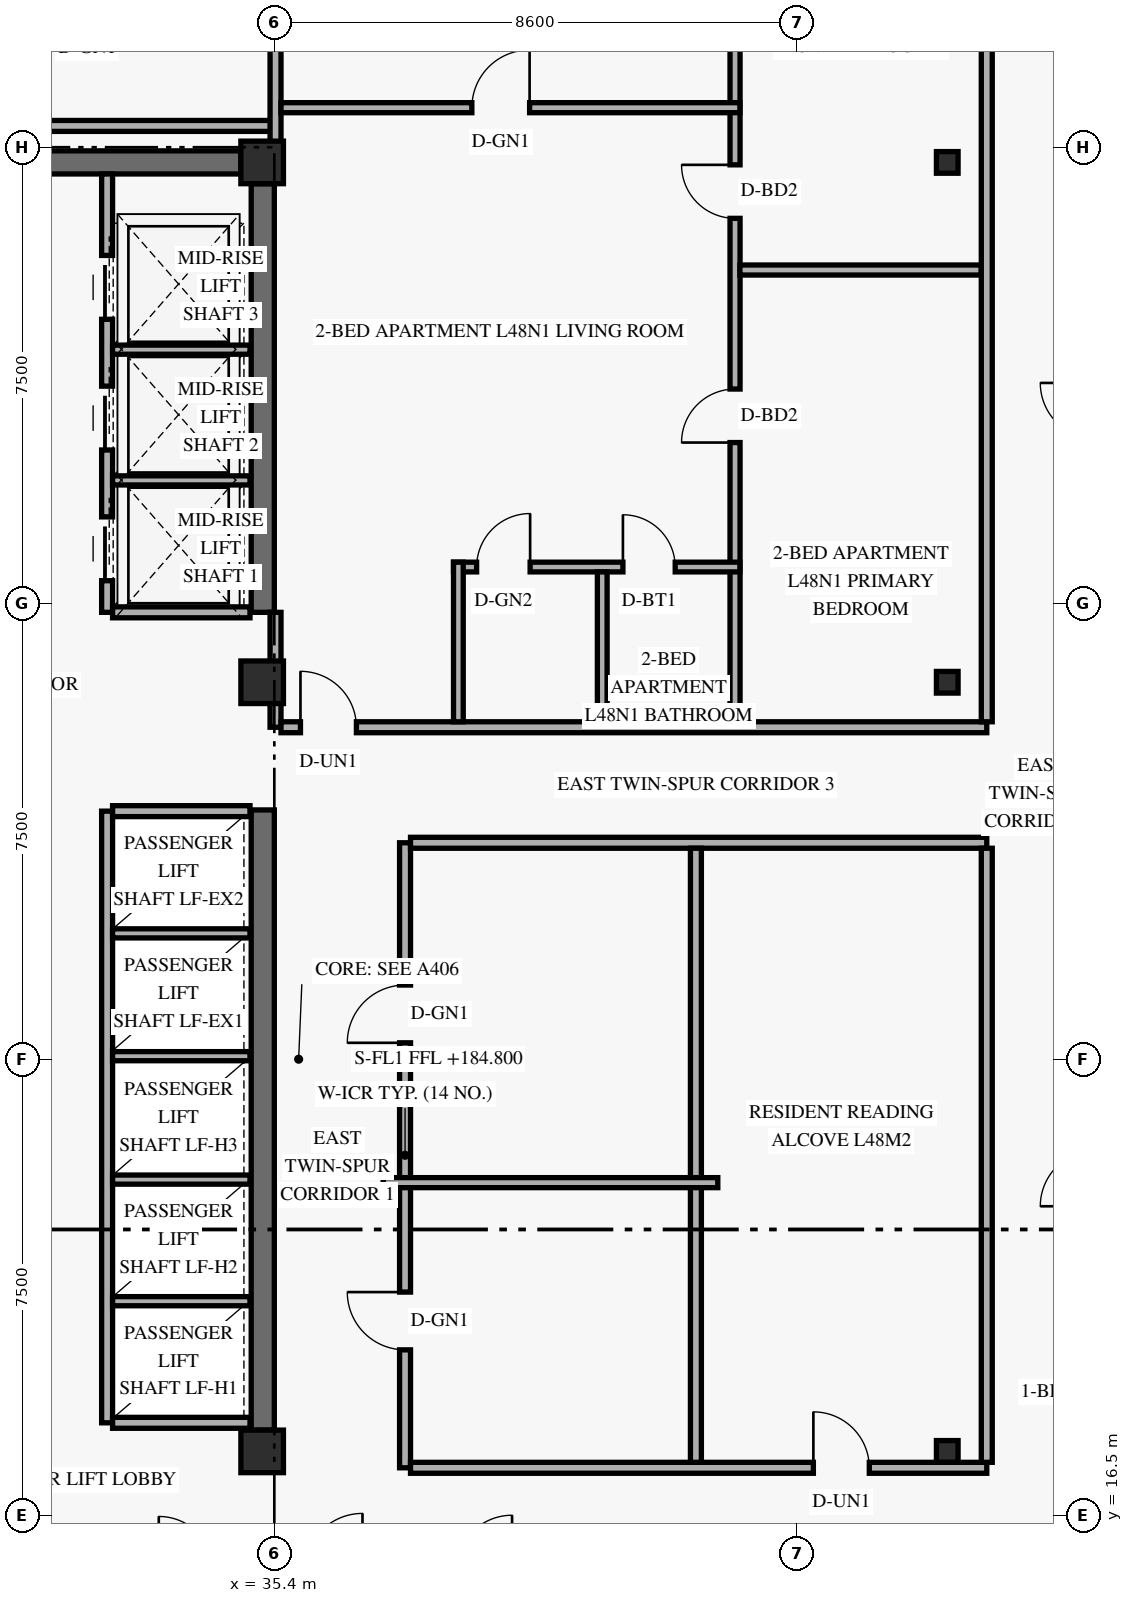
"""IFC4 building model, lengths in metres.
Left out: names, types, materials, properties, quantities, classifications, styles, units other than length and angle.
Written with IfcOpenShell. Run it as: python <this file> out.ifc"""

import sys

from ifc_helpers import new_model, si_unit, direction, frame, frame_2d, origin, origin_2d, place, context, subcontext, project, spatial, rectangle, hollow_rectangle, extrude, element, fill, save


model = new_model("IFC4")
c1 = context("Model", 3, precision=1e-05, world=origin(), true_north=direction((0.0, 1.0)))
c2 = subcontext(c1, "Body", "Model", "MODEL_VIEW")
j1 = project(units=[si_unit("LENGTHUNIT", "METRE"), si_unit("PLANEANGLEUNIT", "RADIAN")], contexts=[c1])
p1 = place(None, origin())
s1 = spatial("IfcSite", under=j1, at=p1, CompositionType="ELEMENT")
p2 = place(p1, origin())
s2 = spatial("IfcBuilding", under=s1, at=p2, CompositionType="ELEMENT")
p3 = place(p2, frame((0.0, 0.0, 184.8)))
s3 = spatial("IfcBuildingStorey", under=s2, at=p3, CompositionType="ELEMENT", Elevation=184.8)
p4 = place(p3, frame((35.21, 17.9, 0.0), z_axis=(0.0, 0.0, 1.0), x_axis=(0.0, 1.0, 0.0)))
e1 = element("IfcWall", 1, at=p4, inside=s3, PredefinedType="SHEAR", context=c2, shape_type="SweptSolid", body=[
    extrude(rectangle(XDim=10.2, YDim=0.38, at=frame_2d((5.1, 0.0))), origin(), (0.0, 0.0, 1.0), 2.748),
])
p5 = place(p3, frame((35.21, 31.35, 0.0), z_axis=(0.0, 0.0, 1.0), x_axis=(0.0, 1.0, 0.0)))
e2 = element("IfcWall", 2, at=p5, inside=s3, PredefinedType="SHEAR", context=c2, shape_type="SweptSolid", body=[
    extrude(rectangle(XDim=7.05, YDim=0.38, at=frame_2d((3.525, 0.0))), origin(), (0.0, 0.0, 1.0), 2.748),
])
p6 = place(p3, frame((24.55, 38.75, 0.0), z_axis=(0.0, 0.0, 1.0), x_axis=(1.0, 0.0, 0.0)))
e3 = element("IfcWall", 3, at=p6, inside=s3, PredefinedType="SHEAR", context=c2, shape_type="SweptSolid", body=[
    extrude(rectangle(XDim=10.3, YDim=0.38, at=frame_2d((5.15, 0.0))), origin(), (0.0, 0.0, 1.0), 3.36),
])
p7 = place(p6, frame((5.2, 0.0, 0.0)))
e4 = element("IfcOpeningElement", 4, at=p7, cuts=e3, PredefinedType="OPENING", context=c2, shape_type="SweptSolid", body=[
    extrude(rectangle(XDim=1.05, YDim=2.15, at=frame_2d((0.525, 1.075))), frame((0.0, 0.2, 0.0), z_axis=(0.0, -1.0, 0.0), x_axis=(1.0, 0.0, 0.0)), (0.0, 0.0, 1.0), 0.4),
])
for number, where, z_axis, x_axis in (
    (5, (35.2, 17.55, 0.0), (0.0, 0.0, 1.0), (1.0, 0.0, 0.0)),
    (6, (35.2, 30.2, 0.0), (0.0, 0.0, 1.0), (1.0, 0.0, 0.0)),
    (7, (35.2, 38.75, 0.0), (0.0, 0.0, 1.0), (1.0, 0.0, 0.0)),
):
    element("IfcColumn", number, at=place(p3, frame(where, z_axis=z_axis, x_axis=x_axis)), inside=s3, PredefinedType="COLUMN", context=c2, shape_type="SweptSolid", body=[
        extrude(rectangle(XDim=0.7, YDim=0.7, at=origin_2d()), origin(), (0.0, 0.0, 1.0), 3.6),
    ])
for number, where, z_axis, x_axis in (
    (8, (46.404, 17.55, 0.0), (0.035, 0.0, 0.999), (0.0, 1.0, 0.0)),
    (9, (46.404, 30.2, 0.0), (0.035, 0.0, 0.999), (0.0, 1.0, 0.0)),
    (10, (46.404, 38.75, 0.0), (0.035, 0.0, 0.999), (0.0, 1.0, 0.0)),
):
    element("IfcColumn", number, at=place(p3, frame(where, z_axis=z_axis, x_axis=x_axis)), inside=s3, PredefinedType="COLUMN", context=c2, shape_type="SweptSolid", body=[
        extrude(hollow_rectangle(XDim=0.356, YDim=0.356, WallThickness=0.016, at=origin_2d()), origin(), (0.0, 0.0, 1.0), 3.602),
    ])
p8 = place(p3, frame((32.65, 18.02, 0.0), z_axis=(0.0, 0.0, 1.0), x_axis=(0.0, 1.0, 0.0)))
e11 = element("IfcWall", 11, at=p8, inside=s3, PredefinedType="STANDARD", context=c2, shape_type="SweptSolid", body=[
    extrude(rectangle(XDim=10.06, YDim=0.18, at=frame_2d((5.03, 0.0))), origin(), (0.0, 0.0, 1.0), 3.36),
])
for number, where, z_axis, x_axis in (
    (12, (32.74, 18.02, 0.0), (0.0, 0.0, 1.0), (1.0, 0.0, 0.0)),
    (13, (32.74, 28.08, 0.0), (0.0, 0.0, 1.0), (1.0, 0.0, 0.0)),
):
    element("IfcWall", number, at=place(p3, frame(where, z_axis=z_axis, x_axis=x_axis)), inside=s3, PredefinedType="STANDARD", context=c2, shape_type="SweptSolid", body=[
        extrude(rectangle(XDim=2.26, YDim=0.18, at=frame_2d((1.13, 0.0))), origin(), (0.0, 0.0, 1.0), 3.36),
    ])
for number, where, z_axis, x_axis in (
    (14, (32.74, 20.02, 0.0), (0.0, 0.0, 1.0), (1.0, 0.0, 0.0)),
    (15, (32.74, 22.02, 0.0), (0.0, 0.0, 1.0), (1.0, 0.0, 0.0)),
    (16, (32.74, 24.05, 0.0), (0.0, 0.0, 1.0), (1.0, 0.0, 0.0)),
    (17, (32.74, 26.07, 0.0), (0.0, 0.0, 1.0), (1.0, 0.0, 0.0)),
):
    element("IfcWall", number, at=place(p3, frame(where, z_axis=z_axis, x_axis=x_axis)), inside=s3, PredefinedType="STANDARD", context=c2, shape_type="SweptSolid", body=[
        extrude(rectangle(XDim=2.26, YDim=0.15, at=frame_2d((1.13, 0.0))), origin(), (0.0, 0.0, 1.0), 3.36),
    ])
p9 = place(p3, frame((32.65, 31.35, 0.0), z_axis=(0.0, 0.0, 1.0), x_axis=(0.0, 1.0, 0.0)))
e18 = element("IfcWall", 18, at=p9, inside=s3, PredefinedType="STANDARD", context=c2, shape_type="SweptSolid", body=[
    extrude(rectangle(XDim=7.21, YDim=0.18, at=frame_2d((3.605, 0.0))), origin(), (0.0, 0.0, 1.0), 3.36),
])
p10 = place(p9, frame((0.52, 0.0, 0.0)))
e19 = element("IfcOpeningElement", 19, at=p10, cuts=e18, PredefinedType="OPENING", context=c2, shape_type="SweptSolid", body=[
    extrude(rectangle(XDim=1.05, YDim=2.2, at=frame_2d((0.525, 1.1))), frame((0.0, 0.1, 0.0), z_axis=(0.0, -1.0, 0.0), x_axis=(1.0, 0.0, 0.0)), (0.0, 0.0, 1.0), 0.2),
])
p11 = place(p9, frame((2.67, 0.0, 0.0)))
e20 = element("IfcOpeningElement", 20, at=p11, cuts=e18, PredefinedType="OPENING", context=c2, shape_type="SweptSolid", body=[
    extrude(rectangle(XDim=1.05, YDim=2.2, at=frame_2d((0.525, 1.1))), frame((0.0, 0.1, 0.0), z_axis=(0.0, -1.0, 0.0), x_axis=(1.0, 0.0, 0.0)), (0.0, 0.0, 1.0), 0.2),
])
p12 = place(p9, frame((4.82, 0.0, 0.0)))
e21 = element("IfcOpeningElement", 21, at=p12, cuts=e18, PredefinedType="OPENING", context=c2, shape_type="SweptSolid", body=[
    extrude(rectangle(XDim=1.05, YDim=2.2, at=frame_2d((0.525, 1.1))), frame((0.0, 0.1, 0.0), z_axis=(0.0, -1.0, 0.0), x_axis=(1.0, 0.0, 0.0)), (0.0, 0.0, 1.0), 0.2),
])
p13 = place(p3, frame((32.74, 31.35, 0.0), z_axis=(0.0, 0.0, 1.0), x_axis=(1.0, 0.0, 0.0)))
e22 = element("IfcWall", 22, at=p13, inside=s3, PredefinedType="STANDARD", context=c2, shape_type="SweptSolid", body=[
    extrude(rectangle(XDim=2.26, YDim=0.18, at=frame_2d((1.13, 0.0))), origin(), (0.0, 0.0, 1.0), 3.36),
])
for number, where, z_axis, x_axis in (
    (23, (32.74, 33.52, 0.0), (0.0, 0.0, 1.0), (1.0, 0.0, 0.0)),
    (24, (32.74, 35.67, 0.0), (0.0, 0.0, 1.0), (1.0, 0.0, 0.0)),
):
    element("IfcWall", number, at=place(p3, frame(where, z_axis=z_axis, x_axis=x_axis)), inside=s3, PredefinedType="STANDARD", context=c2, shape_type="SweptSolid", body=[
        extrude(rectangle(XDim=2.26, YDim=0.15, at=frame_2d((1.13, 0.0))), origin(), (0.0, 0.0, 1.0), 3.36),
    ])
p14 = place(p3, frame((37.55, 17.28, 0.0), z_axis=(0.0, 0.0, 1.0), x_axis=(0.0, 1.0, 0.0)))
e25 = element("IfcWall", 25, at=p14, inside=s3, PredefinedType="STANDARD", context=c2, shape_type="SweptSolid", body=[
    extrude(rectangle(XDim=10.28, YDim=0.18, at=frame_2d((5.14, 0.0))), origin(), (0.0, 0.0, 1.0), 2.73),
])
p15 = place(p14, frame((1.94, 0.0, 0.0)))
e26 = element("IfcOpeningElement", 26, at=p15, cuts=e25, PredefinedType="OPENING", context=c2, shape_type="SweptSolid", body=[
    extrude(rectangle(XDim=0.95, YDim=2.15, at=frame_2d((0.475, 1.075))), frame((0.0, 0.1, 0.0), z_axis=(0.0, -1.0, 0.0), x_axis=(1.0, 0.0, 0.0)), (0.0, 0.0, 1.0), 0.2),
])
p16 = place(p14, frame((6.99, 0.0, 0.0)))
e27 = element("IfcOpeningElement", 27, at=p16, cuts=e25, PredefinedType="OPENING", context=c2, shape_type="SweptSolid", body=[
    extrude(rectangle(XDim=0.95, YDim=2.15, at=frame_2d((0.475, 1.075))), frame((0.0, 0.1, 0.0), z_axis=(0.0, -1.0, 0.0), x_axis=(1.0, 0.0, 0.0)), (0.0, 0.0, 1.0), 0.2),
])
p17 = place(p3, frame((37.64, 17.28, 0.0), z_axis=(0.0, 0.0, 1.0), x_axis=(1.0, 0.0, 0.0)))
e28 = element("IfcWall", 28, at=p17, inside=s3, PredefinedType="STANDARD", context=c2, shape_type="SweptSolid", body=[
    extrude(rectangle(XDim=9.477, YDim=0.18, at=frame_2d((4.739, 0.0))), origin(), (0.0, 0.0, 1.0), 2.73),
])
p18 = place(p17, frame((6.625, 0.0, 0.0)))
e29 = element("IfcOpeningElement", 29, at=p18, cuts=e28, PredefinedType="OPENING", context=c2, shape_type="SweptSolid", body=[
    extrude(rectangle(XDim=0.92, YDim=2.15, at=frame_2d((0.46, 1.075))), frame((0.0, 0.1, 0.0), z_axis=(0.0, -1.0, 0.0), x_axis=(1.0, 0.0, 0.0)), (0.0, 0.0, 1.0), 0.2),
])
p19 = place(p3, frame((37.64, 27.56, 0.0), z_axis=(0.0, 0.0, 1.0), x_axis=(1.0, 0.0, 0.0)))
e30 = element("IfcWall", 30, at=p19, inside=s3, PredefinedType="STANDARD", context=c2, shape_type="SweptSolid", body=[
    extrude(rectangle(XDim=9.477, YDim=0.18, at=frame_2d((4.739, 0.0))), origin(), (0.0, 0.0, 1.0), 2.73),
])
p20 = place(p3, frame((35.42, 29.46, 0.0), z_axis=(0.0, 0.0, 1.0), x_axis=(0.0, 1.0, 0.0)))
e31 = element("IfcWall", 31, at=p20, inside=s3, PredefinedType="STANDARD", context=c2, shape_type="SweptSolid", body=[
    extrude(rectangle(XDim=1.89, YDim=0.18, at=frame_2d((0.945, 0.0))), origin(), (0.0, 0.0, 1.0), 2.73),
])
p21 = place(p3, frame((35.51, 29.46, 0.0), z_axis=(0.0, 0.0, 1.0), x_axis=(1.0, 0.0, 0.0)))
e32 = element("IfcWall", 32, at=p21, inside=s3, PredefinedType="STANDARD", context=c2, shape_type="SweptSolid", body=[
    extrude(rectangle(XDim=11.607, YDim=0.18, at=frame_2d((5.803, 0.0))), origin(), (0.0, 0.0, 1.0), 2.73),
])
p22 = place(p21, frame((0.32, 0.0, 0.0)))
e33 = element("IfcOpeningElement", 33, at=p22, cuts=e32, PredefinedType="OPENING", context=c2, shape_type="SweptSolid", body=[
    extrude(rectangle(XDim=0.92, YDim=2.15, at=frame_2d((0.46, 1.075))), frame((0.0, 0.1, 0.0), z_axis=(0.0, -1.0, 0.0), x_axis=(1.0, 0.0, 0.0)), (0.0, 0.0, 1.0), 0.2),
])
p23 = place(p3, frame((23.85, 39.35, 0.0), z_axis=(0.0, 0.0, 1.0), x_axis=(1.0, 0.0, 0.0)))
e34 = element("IfcWall", 34, at=p23, inside=s3, PredefinedType="STANDARD", context=c2, shape_type="SweptSolid", body=[
    extrude(rectangle(XDim=11.57, YDim=0.18, at=frame_2d((5.785, 0.0))), origin(), (0.0, 0.0, 1.0), 2.73),
])
p24 = place(p3, frame((35.42, 38.75, 0.0), z_axis=(0.0, 0.0, 1.0), x_axis=(0.0, 1.0, 0.0)))
e35 = element("IfcWall", 35, at=p24, inside=s3, PredefinedType="PARTITIONING", context=c2, shape_type="SweptSolid", body=[
    extrude(rectangle(XDim=4.97, YDim=0.18, at=frame_2d((2.485, 0.0))), origin(), (0.0, 0.0, 1.0), 2.73),
])
p25 = place(p3, frame((42.977, 29.55, 0.0), z_axis=(0.0, 0.0, 1.0), x_axis=(0.0, 1.0, 0.0)))
e36 = element("IfcWall", 36, at=p25, inside=s3, PredefinedType="PARTITIONING", context=c2, shape_type="SweptSolid", body=[
    extrude(rectangle(XDim=14.17, YDim=0.165, at=frame_2d((7.085, 0.0))), origin(), (0.0, 0.0, 1.0), 2.73),
])
p26 = place(p25, frame((4.593, 0.0, 0.0)))
e37 = element("IfcOpeningElement", 37, at=p26, cuts=e36, PredefinedType="OPENING", context=c2, shape_type="SweptSolid", body=[
    extrude(rectangle(XDim=0.88, YDim=2.14, at=frame_2d((0.44, 1.07))), frame((0.0, 0.093, 0.0), z_axis=(0.0, -1.0, 0.0), x_axis=(1.0, 0.0, 0.0)), (0.0, 0.0, 1.0), 0.185),
])
p27 = place(p25, frame((8.28, 0.0, 0.0)))
e38 = element("IfcOpeningElement", 38, at=p27, cuts=e36, PredefinedType="OPENING", context=c2, shape_type="SweptSolid", body=[
    extrude(rectangle(XDim=0.88, YDim=2.14, at=frame_2d((0.44, 1.07))), frame((0.0, 0.093, 0.0), z_axis=(0.0, -1.0, 0.0), x_axis=(1.0, 0.0, 0.0)), (0.0, 0.0, 1.0), 0.185),
])
p28 = place(p3, frame((38.347, 32.095, 0.0), z_axis=(0.0, 0.0, 1.0), x_axis=(1.0, 0.0, 0.0)))
e39 = element("IfcWall", 39, at=p28, inside=s3, PredefinedType="PLUMBINGWALL", context=c2, shape_type="SweptSolid", body=[
    extrude(rectangle(XDim=4.71, YDim=0.16, at=frame_2d((2.355, 0.0))), origin(), (0.0, 0.0, 1.0), 3.36),
])
p29 = place(p28, frame((0.38, 0.0, 0.0)))
e40 = element("IfcOpeningElement", 40, at=p29, cuts=e39, PredefinedType="OPENING", context=c2, shape_type="SweptSolid", body=[
    extrude(rectangle(XDim=0.88, YDim=2.12, at=frame_2d((0.44, 1.06))), frame((0.0, 0.09, 0.0), z_axis=(0.0, -1.0, 0.0), x_axis=(1.0, 0.0, 0.0)), (0.0, 0.0, 1.0), 0.18),
])
p30 = place(p28, frame((2.786, 0.0, 0.0)))
e41 = element("IfcOpeningElement", 41, at=p30, cuts=e39, PredefinedType="OPENING", context=c2, shape_type="SweptSolid", body=[
    extrude(rectangle(XDim=0.86, YDim=2.12, at=frame_2d((0.43, 1.06))), frame((0.0, 0.09, 0.0), z_axis=(0.0, -1.0, 0.0), x_axis=(1.0, 0.0, 0.0)), (0.0, 0.0, 1.0), 0.18),
])
p31 = place(p3, frame((38.427, 29.55, 0.0), z_axis=(0.0, 0.0, 1.0), x_axis=(0.0, 1.0, 0.0)))
e42 = element("IfcWall", 42, at=p31, inside=s3, PredefinedType="PLUMBINGWALL", context=c2, shape_type="SweptSolid", body=[
    extrude(rectangle(XDim=2.625, YDim=0.16, at=frame_2d((1.312, 0.0))), origin(), (0.0, 0.0, 1.0), 2.73),
])
p32 = place(p3, frame((40.793, 29.55, 0.0), z_axis=(0.0, 0.0, 1.0), x_axis=(0.0, 1.0, 0.0)))
e43 = element("IfcWall", 43, at=p32, inside=s3, PredefinedType="PLUMBINGWALL", context=c2, shape_type="SweptSolid", body=[
    extrude(rectangle(XDim=2.465, YDim=0.16, at=frame_2d((1.232, 0.0))), origin(), (0.0, 0.0, 1.0), 2.73),
])
p33 = place(p3, frame((35.51, 39.65, 0.0), z_axis=(0.0, 0.0, 1.0), x_axis=(1.0, 0.0, 0.0)))
e44 = element("IfcWall", 44, at=p33, inside=s3, PredefinedType="PARTITIONING", context=c2, shape_type="SweptSolid", body=[
    extrude(rectangle(XDim=7.547, YDim=0.165, at=frame_2d((3.773, 0.0))), origin(), (0.0, 0.0, 1.0), 3.36),
])
p34 = place(p33, frame((3.138, 0.0, 0.0)))
e45 = element("IfcOpeningElement", 45, at=p34, cuts=e44, PredefinedType="OPENING", context=c2, shape_type="SweptSolid", body=[
    extrude(rectangle(XDim=0.95, YDim=2.15, at=frame_2d((0.475, 1.075))), frame((0.0, 0.093, 0.0), z_axis=(0.0, -1.0, 0.0), x_axis=(1.0, 0.0, 0.0)), (0.0, 0.0, 1.0), 0.185),
])
p35 = place(p3, frame((43.057, 36.98, 0.0), z_axis=(0.0, 0.0, 1.0), x_axis=(1.0, 0.0, 0.0)))
e46 = element("IfcWall", 46, at=p35, inside=s3, PredefinedType="PARTITIONING", context=c2, shape_type="SweptSolid", body=[
    extrude(rectangle(XDim=3.97, YDim=0.165, at=frame_2d((1.985, 0.0))), origin(), (0.0, 0.0, 1.0), 2.73),
])
p36 = place(p3, frame((42.333, 17.37, 0.0), z_axis=(0.0, 0.0, 1.0), x_axis=(0.0, 1.0, 0.0)))
e47 = element("IfcWall", 47, at=p36, inside=s3, PredefinedType="PARTITIONING", context=c2, shape_type="SweptSolid", body=[
    extrude(rectangle(XDim=10.1, YDim=0.18, at=frame_2d((5.05, 0.0))), origin(), (0.0, 0.0, 1.0), 2.73),
])
p37 = place(p3, frame((37.19, 21.97, 0.0), z_axis=(0.0, 0.0, 1.0), x_axis=(1.0, 0.0, 0.0)))
e48 = element("IfcWall", 48, at=p37, inside=s3, PredefinedType="PARTITIONING", context=c2, shape_type="SweptSolid", body=[
    extrude(rectangle(XDim=5.504, YDim=0.165, at=frame_2d((2.752, 0.0))), origin(), (0.0, 0.0, 1.0), 2.73),
])
p38 = place(p3, frame((47.117, 17.37, 0.0), z_axis=(0.0, 0.0, 1.0), x_axis=(0.0, 1.0, 0.0)))
e49 = element("IfcWall", 49, at=p38, inside=s3, PredefinedType="STANDARD", context=c2, shape_type="SweptSolid", body=[
    extrude(rectangle(XDim=10.1, YDim=0.18, at=frame_2d((5.05, 0.0))), origin(), (0.0, 0.0, 1.0), 2.73),
])
p39 = place(p3, frame((47.117, 29.55, 0.0), z_axis=(0.0, 0.0, 1.0), x_axis=(0.0, 1.0, 0.0)))
e50 = element("IfcWall", 50, at=p39, inside=s3, PredefinedType="STANDARD", context=c2, shape_type="SweptSolid", body=[
    extrude(rectangle(XDim=14.17, YDim=0.18, at=frame_2d((7.085, 0.0))), origin(), (0.0, 0.0, 1.0), 2.73),
])
p40 = place(p10, origin())
e51 = element("IfcDoor", 51, at=p40, inside=s3, OperationType="SLIDING_TO_LEFT", PredefinedType="DOOR", context=c2, shape_type="SweptSolid", body=[
    extrude(rectangle(XDim=1.05, YDim=2.2, at=frame_2d((0.525, 1.1))), frame((0.0, 0.025, 0.0), z_axis=(0.0, -1.0, 0.0), x_axis=(1.0, 0.0, 0.0)), (0.0, 0.0, 1.0), 0.05),
])
fill(e19, e51)
p41 = place(p11, origin())
e52 = element("IfcDoor", 52, at=p41, inside=s3, OperationType="SLIDING_TO_LEFT", PredefinedType="DOOR", context=c2, shape_type="SweptSolid", body=[
    extrude(rectangle(XDim=1.05, YDim=2.2, at=frame_2d((0.525, 1.1))), frame((0.0, 0.025, 0.0), z_axis=(0.0, -1.0, 0.0), x_axis=(1.0, 0.0, 0.0)), (0.0, 0.0, 1.0), 0.05),
])
fill(e20, e52)
p42 = place(p12, origin())
e53 = element("IfcDoor", 53, at=p42, inside=s3, OperationType="SLIDING_TO_LEFT", PredefinedType="DOOR", context=c2, shape_type="SweptSolid", body=[
    extrude(rectangle(XDim=1.05, YDim=2.2, at=frame_2d((0.525, 1.1))), frame((0.0, 0.025, 0.0), z_axis=(0.0, -1.0, 0.0), x_axis=(1.0, 0.0, 0.0)), (0.0, 0.0, 1.0), 0.05),
])
fill(e21, e53)
p43 = place(p34, origin())
e54 = element("IfcDoor", 54, at=p43, inside=s3, OperationType="SINGLE_SWING_RIGHT", PredefinedType="DOOR", context=c2, shape_type="SweptSolid", body=[
    extrude(rectangle(XDim=0.95, YDim=2.15, at=frame_2d((0.475, 1.075))), frame((0.0, 0.025, 0.0), z_axis=(0.0, -1.0, 0.0), x_axis=(1.0, 0.0, 0.0)), (0.0, 0.0, 1.0), 0.05),
])
fill(e45, e54)
p44 = place(p22, origin())
e55 = element("IfcDoor", 55, at=p44, inside=s3, OperationType="SINGLE_SWING_LEFT", PredefinedType="DOOR", context=c2, shape_type="SweptSolid", body=[
    extrude(rectangle(XDim=0.92, YDim=2.15, at=frame_2d((0.46, 1.075))), frame((0.0, 0.025, 0.0), z_axis=(0.0, -1.0, 0.0), x_axis=(1.0, 0.0, 0.0)), (0.0, 0.0, 1.0), 0.05),
])
fill(e33, e55)
p45 = place(p29, origin())
e56 = element("IfcDoor", 56, at=p45, inside=s3, OperationType="SINGLE_SWING_RIGHT", PredefinedType="DOOR", context=c2, shape_type="SweptSolid", body=[
    extrude(rectangle(XDim=0.88, YDim=2.12, at=frame_2d((0.44, 1.06))), frame((0.0, 0.025, 0.0), z_axis=(0.0, -1.0, 0.0), x_axis=(1.0, 0.0, 0.0)), (0.0, 0.0, 1.0), 0.05),
])
fill(e40, e56)
p46 = place(p30, origin())
e57 = element("IfcDoor", 57, at=p46, inside=s3, OperationType="SINGLE_SWING_LEFT", PredefinedType="DOOR", context=c2, shape_type="SweptSolid", body=[
    extrude(rectangle(XDim=0.86, YDim=2.12, at=frame_2d((0.43, 1.06))), frame((0.0, 0.025, 0.0), z_axis=(0.0, -1.0, 0.0), x_axis=(1.0, 0.0, 0.0)), (0.0, 0.0, 1.0), 0.05),
])
fill(e41, e57)
p47 = place(p26, origin())
e58 = element("IfcDoor", 58, at=p47, inside=s3, OperationType="SINGLE_SWING_LEFT", PredefinedType="DOOR", context=c2, shape_type="SweptSolid", body=[
    extrude(rectangle(XDim=0.88, YDim=2.14, at=frame_2d((0.44, 1.07))), frame((0.0, 0.025, 0.0), z_axis=(0.0, -1.0, 0.0), x_axis=(1.0, 0.0, 0.0)), (0.0, 0.0, 1.0), 0.05),
])
fill(e37, e58)
p48 = place(p27, origin())
e59 = element("IfcDoor", 59, at=p48, inside=s3, OperationType="SINGLE_SWING_RIGHT", PredefinedType="DOOR", context=c2, shape_type="SweptSolid", body=[
    extrude(rectangle(XDim=0.88, YDim=2.14, at=frame_2d((0.44, 1.07))), frame((0.0, 0.025, 0.0), z_axis=(0.0, -1.0, 0.0), x_axis=(1.0, 0.0, 0.0)), (0.0, 0.0, 1.0), 0.05),
])
fill(e38, e59)
p49 = place(p15, origin())
e60 = element("IfcDoor", 60, at=p49, inside=s3, OperationType="SINGLE_SWING_RIGHT", PredefinedType="DOOR", context=c2, shape_type="SweptSolid", body=[
    extrude(rectangle(XDim=0.95, YDim=2.15, at=frame_2d((0.475, 1.075))), frame((0.0, 0.025, 0.0), z_axis=(0.0, -1.0, 0.0), x_axis=(1.0, 0.0, 0.0)), (0.0, 0.0, 1.0), 0.05),
])
fill(e26, e60)
p50 = place(p16, origin())
e61 = element("IfcDoor", 61, at=p50, inside=s3, OperationType="SINGLE_SWING_LEFT", PredefinedType="DOOR", context=c2, shape_type="SweptSolid", body=[
    extrude(rectangle(XDim=0.95, YDim=2.15, at=frame_2d((0.475, 1.075))), frame((0.0, 0.025, 0.0), z_axis=(0.0, -1.0, 0.0), x_axis=(1.0, 0.0, 0.0)), (0.0, 0.0, 1.0), 0.05),
])
fill(e27, e61)
p51 = place(p18, origin())
e62 = element("IfcDoor", 62, at=p51, inside=s3, OperationType="SINGLE_SWING_LEFT", PredefinedType="DOOR", context=c2, shape_type="SweptSolid", body=[
    extrude(rectangle(XDim=0.92, YDim=2.15, at=frame_2d((0.46, 1.075))), frame((0.0, 0.025, 0.0), z_axis=(0.0, -1.0, 0.0), x_axis=(1.0, 0.0, 0.0)), (0.0, 0.0, 1.0), 0.05),
])
fill(e29, e62)
save(model, sys.argv[1])
